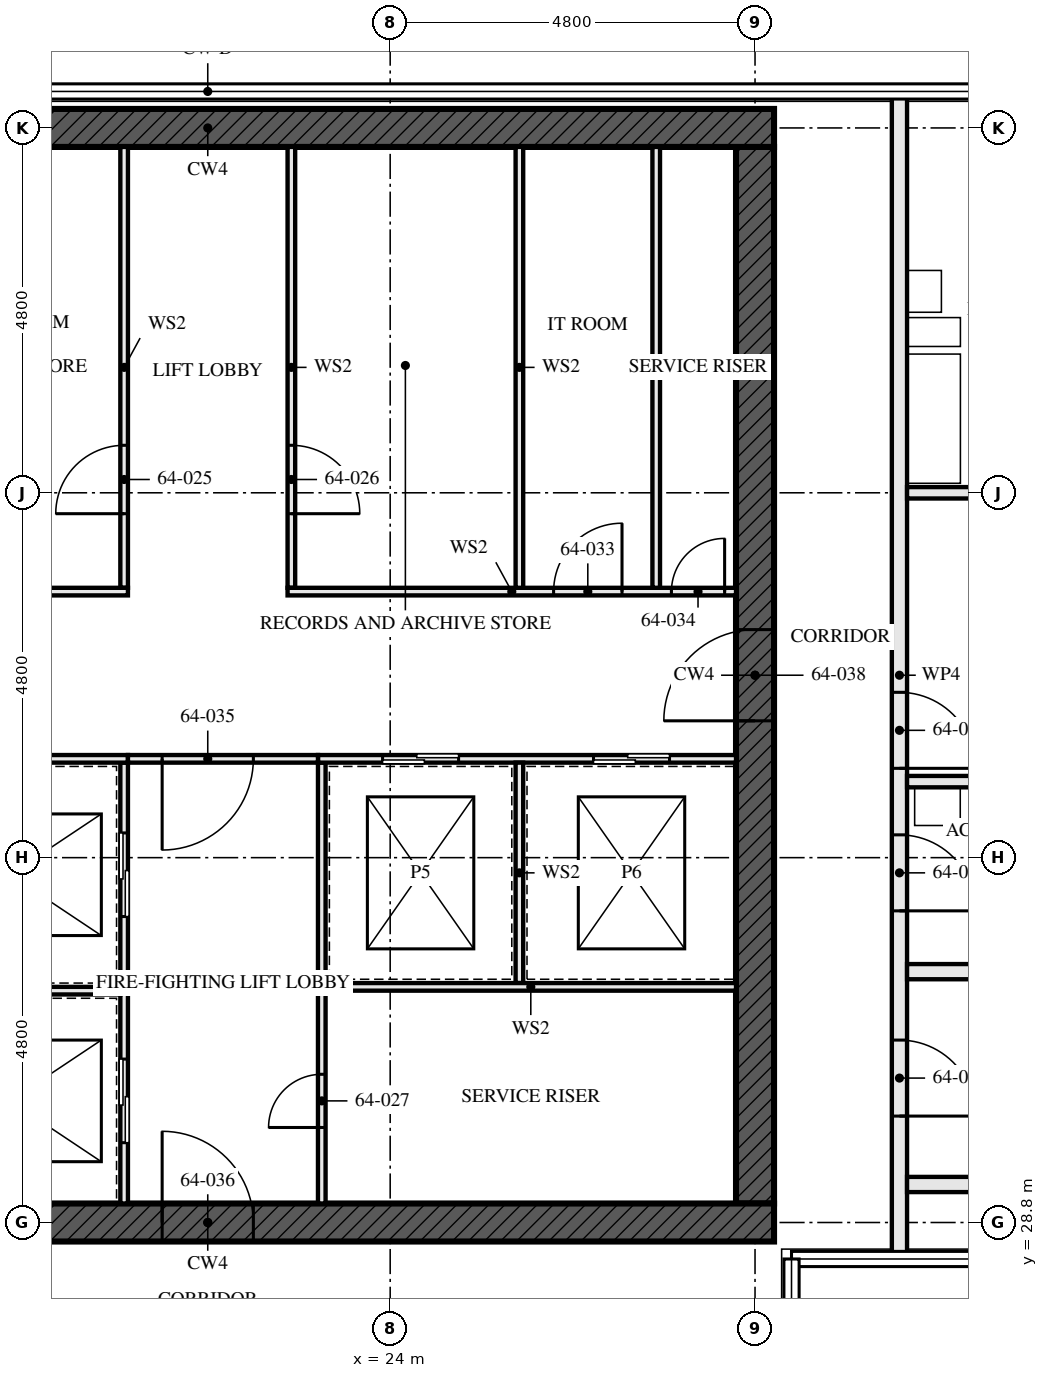
"""IFC4 building model, lengths in metres.
Left out: names, types, materials, properties, quantities, classifications, styles, units other than length and angle.
Written with IfcOpenShell. Run it as: python <this file> out.ifc"""

import sys

from ifc_helpers import new_model, si_unit, direction, frame, frame_2d, origin, place, context, subcontext, project, spatial, rectangle, extrude, element, fill, save


model = new_model("IFC4")
c1 = context("Model", 3, precision=1e-05, world=origin(), true_north=direction((0.0, 1.0)))
c2 = subcontext(c1, "Body", "Model", "MODEL_VIEW")
j1 = project(units=[si_unit("LENGTHUNIT", "METRE"), si_unit("PLANEANGLEUNIT", "RADIAN")], contexts=[c1])
p1 = place(None, origin())
s1 = spatial("IfcSite", under=j1, at=p1, CompositionType="ELEMENT")
p2 = place(p1, origin())
s2 = spatial("IfcBuilding", under=s1, at=p2, CompositionType="ELEMENT")
p3 = place(p2, frame((0.0, 0.0, 233.0)))
s3 = spatial("IfcBuildingStorey", under=s2, at=p3, CompositionType="ELEMENT", Elevation=233.0)
p4 = place(p3, frame((14.15, 28.8, -0.17), z_axis=(0.0, 0.0, 1.0), x_axis=(1.0, 0.0, 0.0)))
e1 = element("IfcWall", 1, at=p4, inside=s3, PredefinedType="SHEAR", context=c2, shape_type="SweptSolid", body=[
    extrude(rectangle(XDim=14.9, YDim=0.5, at=frame_2d((7.45, 0.0))), origin(), (0.0, 0.0, 1.0), 3.5),
])
p5 = place(p4, frame((6.85, 0.0, 0.17)))
e2 = element("IfcOpeningElement", 2, at=p5, cuts=e1, PredefinedType="OPENING", context=c2, shape_type="SweptSolid", body=[
    extrude(rectangle(XDim=1.2, YDim=2.1, at=frame_2d((0.6, 1.05))), frame((0.0, 0.26, 0.0), z_axis=(0.0, -1.0, 0.0), x_axis=(1.0, 0.0, 0.0)), (0.0, 0.0, 1.0), 0.521),
])
p6 = place(p3, frame((29.05, 43.2, -0.17), z_axis=(0.0, 0.0, 1.0), x_axis=(-1.0, 0.0, 0.0)))
e3 = element("IfcWall", 3, at=p6, inside=s3, PredefinedType="SHEAR", context=c2, shape_type="SweptSolid", body=[
    extrude(rectangle(XDim=14.9, YDim=0.5, at=frame_2d((7.45, 0.0))), origin(), (0.0, 0.0, 1.0), 3.5),
])
p7 = place(p3, frame((28.8, 29.05, -0.17), z_axis=(0.0, 0.0, 1.0), x_axis=(0.0, 1.0, 0.0)))
e4 = element("IfcWall", 4, at=p7, inside=s3, PredefinedType="SHEAR", context=c2, shape_type="SweptSolid", body=[
    extrude(rectangle(XDim=13.9, YDim=0.5, at=frame_2d((6.95, 0.0))), origin(), (0.0, 0.0, 1.0), 3.5),
])
p8 = place(p7, frame((6.35, 0.0, 0.17)))
e5 = element("IfcOpeningElement", 5, at=p8, cuts=e4, PredefinedType="OPENING", context=c2, shape_type="SweptSolid", body=[
    extrude(rectangle(XDim=1.2, YDim=2.1, at=frame_2d((0.6, 1.05))), frame((0.0, 0.26, 0.0), z_axis=(0.0, -1.0, 0.0), x_axis=(1.0, 0.0, 0.0)), (0.0, 0.0, 1.0), 0.521),
])
for number, where, z_axis, x_axis in (
    (6, (35.5, 29.3, 0.0), (0.0, 0.0, 1.0), (-1.0, 0.0, 0.0)),
    (7, (35.5, 32.1, 0.0), (0.0, 0.0, 1.0), (-1.0, 0.0, 0.0)),
):
    element("IfcWall", number, at=place(p3, frame(where, z_axis=z_axis, x_axis=x_axis)), inside=s3, PredefinedType="SOLIDWALL", context=c2, shape_type="SweptSolid", body=[
        extrude(rectangle(XDim=4.7, YDim=0.2, at=frame_2d((2.35, 0.0))), origin(), (0.0, 0.0, 1.0), 2.99),
    ])
p9 = place(p3, frame((33.8, 34.6, 0.0), z_axis=(0.0, 0.0, 1.0), x_axis=(-1.0, 0.0, 0.0)))
e8 = element("IfcWall", 8, at=p9, inside=s3, PredefinedType="PARTITIONING", context=c2, shape_type="SweptSolid", body=[
    extrude(rectangle(XDim=3.0, YDim=0.15, at=frame_2d((1.5, 0.0))), origin(), (0.0, 0.0, 1.0), 3.33),
])
p10 = place(p3, frame((33.8, 38.4, 0.0), z_axis=(0.0, 0.0, 1.0), x_axis=(-1.0, 0.0, 0.0)))
e9 = element("IfcWall", 9, at=p10, inside=s3, PredefinedType="PARTITIONING", context=c2, shape_type="SweptSolid", body=[
    extrude(rectangle(XDim=3.0, YDim=0.15, at=frame_2d((1.5, 0.0))), origin(), (0.0, 0.0, 1.0), 2.55),
])
p11 = place(p10, frame((1.05, 0.0, 0.0)))
e10 = element("IfcOpeningElement", 10, at=p11, cuts=e9, PredefinedType="OPENING", context=c2, shape_type="SweptSolid", body=[
    extrude(rectangle(XDim=0.9, YDim=2.1, at=frame_2d((0.45, 1.05))), frame((0.0, 0.085, 0.0), z_axis=(0.0, -1.0, 0.0), x_axis=(1.0, 0.0, 0.0)), (0.0, 0.0, 1.0), 0.171),
])
p12 = place(p3, frame((30.7, 28.345, 0.0), z_axis=(0.0, 0.0, 1.0), x_axis=(0.0, 1.0, 0.0)))
e11 = element("IfcWall", 11, at=p12, inside=s3, PredefinedType="PARTITIONING", context=c2, shape_type="SweptSolid", body=[
    extrude(rectangle(XDim=15.31, YDim=0.2, at=frame_2d((7.655, 0.0))), origin(), (0.0, 0.0, 1.0), 2.32),
])
p13 = place(p12, frame((1.855, 0.0, 0.0)))
e12 = element("IfcOpeningElement", 12, at=p13, cuts=e11, PredefinedType="OPENING", context=c2, shape_type="SweptSolid", body=[
    extrude(rectangle(XDim=1.0, YDim=2.1, at=frame_2d((0.5, 1.05))), frame((0.0, 0.111, 0.0), z_axis=(0.0, -1.0, 0.0), x_axis=(1.0, 0.0, 0.0)), (0.0, 0.0, 1.0), 0.221),
])
p14 = place(p12, frame((4.555, 0.0, 0.0)))
e13 = element("IfcOpeningElement", 13, at=p14, cuts=e11, PredefinedType="OPENING", context=c2, shape_type="SweptSolid", body=[
    extrude(rectangle(XDim=1.0, YDim=2.1, at=frame_2d((0.5, 1.05))), frame((0.0, 0.111, 0.0), z_axis=(0.0, -1.0, 0.0), x_axis=(1.0, 0.0, 0.0)), (0.0, 0.0, 1.0), 0.221),
])
p15 = place(p12, frame((6.43, 0.0, 0.0)))
e14 = element("IfcOpeningElement", 14, at=p15, cuts=e11, PredefinedType="OPENING", context=c2, shape_type="SweptSolid", body=[
    extrude(rectangle(XDim=1.0, YDim=2.1, at=frame_2d((0.5, 1.05))), frame((0.0, 0.111, 0.0), z_axis=(0.0, -1.0, 0.0), x_axis=(1.0, 0.0, 0.0)), (0.0, 0.0, 1.0), 0.221),
])
p16 = place(p3, frame((27.5, 37.15, 0.0), z_axis=(0.0, 0.0, 1.0), x_axis=(0.0, 1.0, 0.0)))
e15 = element("IfcWall", 15, at=p16, inside=s3, PredefinedType="SOLIDWALL", context=c2, shape_type="SweptSolid", body=[
    extrude(rectangle(XDim=5.8, YDim=0.1, at=frame_2d((2.9, 0.0))), origin(), (0.0, 0.0, 1.0), 3.33),
])
p17 = place(p3, frame((20.5, 29.05, 0.0), z_axis=(0.0, 0.0, 1.0), x_axis=(0.0, 1.0, 0.0)))
e16 = element("IfcWall", 16, at=p17, inside=s3, PredefinedType="SOLIDWALL", context=c2, shape_type="SweptSolid", body=[
    extrude(rectangle(XDim=5.8, YDim=0.1, at=frame_2d((2.9, 0.0))), origin(), (0.0, 0.0, 1.0), 3.33),
])
p18 = place(p17, frame((0.8, 0.0, 0.0)))
e17 = element("IfcOpeningElement", 17, at=p18, cuts=e16, PredefinedType="OPENING", context=c2, shape_type="SweptSolid", body=[
    extrude(rectangle(XDim=1.1, YDim=2.3, at=frame_2d((0.55, 1.15))), frame((0.0, 0.061, 0.0), z_axis=(0.0, -1.0, 0.0), x_axis=(1.0, 0.0, 0.0)), (0.0, 0.0, 1.0), 0.121),
])
p19 = place(p17, frame((3.775, 0.0, 0.0)))
e18 = element("IfcOpeningElement", 18, at=p19, cuts=e16, PredefinedType="OPENING", context=c2, shape_type="SweptSolid", body=[
    extrude(rectangle(XDim=1.1, YDim=2.3, at=frame_2d((0.55, 1.15))), frame((0.0, 0.061, 0.0), z_axis=(0.0, -1.0, 0.0), x_axis=(1.0, 0.0, 0.0)), (0.0, 0.0, 1.0), 0.121),
])
p20 = place(p3, frame((20.5, 37.15, 0.0), z_axis=(0.0, 0.0, 1.0), x_axis=(0.0, 1.0, 0.0)))
e19 = element("IfcWall", 19, at=p20, inside=s3, PredefinedType="SOLIDWALL", context=c2, shape_type="SweptSolid", body=[
    extrude(rectangle(XDim=5.8, YDim=0.1, at=frame_2d((2.9, 0.0))), origin(), (0.0, 0.0, 1.0), 3.33),
])
p21 = place(p20, frame((0.975, 0.0, 0.0)))
e20 = element("IfcOpeningElement", 20, at=p21, cuts=e19, PredefinedType="OPENING", context=c2, shape_type="SweptSolid", body=[
    extrude(rectangle(XDim=0.9, YDim=2.1, at=frame_2d((0.45, 1.05))), frame((0.0, 0.061, 0.0), z_axis=(0.0, -1.0, 0.0), x_axis=(1.0, 0.0, 0.0)), (0.0, 0.0, 1.0), 0.121),
])
p22 = place(p3, frame((22.7, 37.15, 0.0), z_axis=(0.0, 0.0, 1.0), x_axis=(0.0, 1.0, 0.0)))
e21 = element("IfcWall", 21, at=p22, inside=s3, PredefinedType="SOLIDWALL", context=c2, shape_type="SweptSolid", body=[
    extrude(rectangle(XDim=5.8, YDim=0.1, at=frame_2d((2.9, 0.0))), origin(), (0.0, 0.0, 1.0), 3.33),
])
p23 = place(p22, frame((0.975, 0.0, 0.0)))
e22 = element("IfcOpeningElement", 22, at=p23, cuts=e21, PredefinedType="OPENING", context=c2, shape_type="SweptSolid", body=[
    extrude(rectangle(XDim=0.9, YDim=2.1, at=frame_2d((0.45, 1.05))), frame((0.0, 0.061, 0.0), z_axis=(0.0, -1.0, 0.0), x_axis=(1.0, 0.0, 0.0)), (0.0, 0.0, 1.0), 0.121),
])
p24 = place(p3, frame((23.1, 29.05, 0.0), z_axis=(0.0, 0.0, 1.0), x_axis=(0.0, 1.0, 0.0)))
e23 = element("IfcWall", 23, at=p24, inside=s3, PredefinedType="SOLIDWALL", context=c2, shape_type="SweptSolid", body=[
    extrude(rectangle(XDim=5.8, YDim=0.1, at=frame_2d((2.9, 0.0))), origin(), (0.0, 0.0, 1.0), 3.33),
])
p25 = place(p24, frame((1.0, 0.0, 0.0)))
e24 = element("IfcOpeningElement", 24, at=p25, cuts=e23, PredefinedType="OPENING", context=c2, shape_type="SweptSolid", body=[
    extrude(rectangle(XDim=0.7, YDim=2.1, at=frame_2d((0.35, 1.05))), frame((0.0, 0.061, 0.0), z_axis=(0.0, -1.0, 0.0), x_axis=(1.0, 0.0, 0.0)), (0.0, 0.0, 1.0), 0.121),
])
p26 = place(p3, frame((14.65, 34.9, 0.0), z_axis=(0.0, 0.0, 1.0), x_axis=(1.0, 0.0, 0.0)))
e25 = element("IfcWall", 25, at=p26, inside=s3, PredefinedType="SOLIDWALL", context=c2, shape_type="SweptSolid", body=[
    extrude(rectangle(XDim=5.9, YDim=0.1, at=frame_2d((2.95, 0.0))), origin(), (0.0, 0.0, 1.0), 3.33),
])
p27 = place(p26, frame((1.6, 0.0, 0.0)))
e26 = element("IfcOpeningElement", 26, at=p27, cuts=e25, PredefinedType="OPENING", context=c2, shape_type="SweptSolid", body=[
    extrude(rectangle(XDim=0.7, YDim=2.1, at=frame_2d((0.35, 1.05))), frame((0.0, 0.061, 0.0), z_axis=(0.0, -1.0, 0.0), x_axis=(1.0, 0.0, 0.0)), (0.0, 0.0, 1.0), 0.121),
])
p28 = place(p3, frame((23.05, 34.9, 0.0), z_axis=(0.0, 0.0, 1.0), x_axis=(1.0, 0.0, 0.0)))
e27 = element("IfcWall", 27, at=p28, inside=s3, PredefinedType="SOLIDWALL", context=c2, shape_type="SweptSolid", body=[
    extrude(rectangle(XDim=5.5, YDim=0.1, at=frame_2d((2.75, 0.0))), origin(), (0.0, 0.0, 1.0), 3.33),
])
p29 = place(p28, frame((0.85, 0.0, 0.0)))
e28 = element("IfcOpeningElement", 28, at=p29, cuts=e27, PredefinedType="OPENING", context=c2, shape_type="SweptSolid", body=[
    extrude(rectangle(XDim=1.0, YDim=2.1, at=frame_2d((0.5, 1.05))), frame((0.0, 0.061, 0.0), z_axis=(0.0, -1.0, 0.0), x_axis=(1.0, 0.0, 0.0)), (0.0, 0.0, 1.0), 0.121),
])
p30 = place(p28, frame((3.625, 0.0, 0.0)))
e29 = element("IfcOpeningElement", 29, at=p30, cuts=e27, PredefinedType="OPENING", context=c2, shape_type="SweptSolid", body=[
    extrude(rectangle(XDim=1.0, YDim=2.1, at=frame_2d((0.5, 1.05))), frame((0.0, 0.061, 0.0), z_axis=(0.0, -1.0, 0.0), x_axis=(1.0, 0.0, 0.0)), (0.0, 0.0, 1.0), 0.121),
])
p31 = place(p3, frame((14.65, 37.1, 0.0), z_axis=(0.0, 0.0, 1.0), x_axis=(1.0, 0.0, 0.0)))
e30 = element("IfcWall", 30, at=p31, inside=s3, PredefinedType="SOLIDWALL", context=c2, shape_type="SweptSolid", body=[
    extrude(rectangle(XDim=5.9, YDim=0.1, at=frame_2d((2.95, 0.0))), origin(), (0.0, 0.0, 1.0), 3.33),
])
p32 = place(p31, frame((0.15, 0.0, 0.0)))
e31 = element("IfcOpeningElement", 31, at=p32, cuts=e30, PredefinedType="OPENING", context=c2, shape_type="SweptSolid", body=[
    extrude(rectangle(XDim=0.7, YDim=2.1, at=frame_2d((0.35, 1.05))), frame((0.0, 0.061, 0.0), z_axis=(0.0, -1.0, 0.0), x_axis=(1.0, 0.0, 0.0)), (0.0, 0.0, 1.0), 0.121),
])
p33 = place(p31, frame((1.5, 0.0, 0.0)))
e32 = element("IfcOpeningElement", 32, at=p33, cuts=e30, PredefinedType="OPENING", context=c2, shape_type="SweptSolid", body=[
    extrude(rectangle(XDim=0.9, YDim=2.1, at=frame_2d((0.45, 1.05))), frame((0.0, 0.061, 0.0), z_axis=(0.0, -1.0, 0.0), x_axis=(1.0, 0.0, 0.0)), (0.0, 0.0, 1.0), 0.121),
])
p34 = place(p3, frame((22.65, 37.1, 0.0), z_axis=(0.0, 0.0, 1.0), x_axis=(1.0, 0.0, 0.0)))
e33 = element("IfcWall", 33, at=p34, inside=s3, PredefinedType="SOLIDWALL", context=c2, shape_type="SweptSolid", body=[
    extrude(rectangle(XDim=5.9, YDim=0.1, at=frame_2d((2.95, 0.0))), origin(), (0.0, 0.0, 1.0), 3.33),
])
p35 = place(p34, frame((3.5, 0.0, 0.0)))
e34 = element("IfcOpeningElement", 34, at=p35, cuts=e33, PredefinedType="OPENING", context=c2, shape_type="SweptSolid", body=[
    extrude(rectangle(XDim=0.9, YDim=2.1, at=frame_2d((0.45, 1.05))), frame((0.0, 0.061, 0.0), z_axis=(0.0, -1.0, 0.0), x_axis=(1.0, 0.0, 0.0)), (0.0, 0.0, 1.0), 0.121),
])
p36 = place(p34, frame((5.05, 0.0, 0.0)))
e35 = element("IfcOpeningElement", 35, at=p36, cuts=e33, PredefinedType="OPENING", context=c2, shape_type="SweptSolid", body=[
    extrude(rectangle(XDim=0.7, YDim=2.1, at=frame_2d((0.35, 1.05))), frame((0.0, 0.061, 0.0), z_axis=(0.0, -1.0, 0.0), x_axis=(1.0, 0.0, 0.0)), (0.0, 0.0, 1.0), 0.121),
])
p37 = place(p3, frame((20.55, 34.9, 0.0), z_axis=(0.0, 0.0, 1.0), x_axis=(1.0, 0.0, 0.0)))
e36 = element("IfcWall", 36, at=p37, inside=s3, PredefinedType="SOLIDWALL", context=c2, shape_type="SweptSolid", body=[
    extrude(rectangle(XDim=2.5, YDim=0.1, at=frame_2d((1.25, 0.0))), origin(), (0.0, 0.0, 1.0), 3.33),
])
p38 = place(p37, frame((0.45, 0.0, 0.0)))
e37 = element("IfcOpeningElement", 37, at=p38, cuts=e36, PredefinedType="OPENING", context=c2, shape_type="SweptSolid", body=[
    extrude(rectangle(XDim=1.2, YDim=2.1, at=frame_2d((0.6, 1.05))), frame((0.0, 0.061, 0.0), z_axis=(0.0, -1.0, 0.0), x_axis=(1.0, 0.0, 0.0)), (0.0, 0.0, 1.0), 0.121),
])
p39 = place(p3, frame((17.55, 31.85, 0.0), z_axis=(0.0, 0.0, 1.0), x_axis=(1.0, 0.0, 0.0)))
e38 = element("IfcWall", 38, at=p39, inside=s3, PredefinedType="SOLIDWALL", context=c2, shape_type="SweptSolid", body=[
    extrude(rectangle(XDim=2.9, YDim=0.1, at=frame_2d((1.45, 0.0))), origin(), (0.0, 0.0, 1.0), 3.33),
])
p40 = place(p3, frame((25.7, 37.15, 0.0), z_axis=(0.0, 0.0, 1.0), x_axis=(0.0, 1.0, 0.0)))
e39 = element("IfcWall", 39, at=p40, inside=s3, PredefinedType="SOLIDWALL", context=c2, shape_type="SweptSolid", body=[
    extrude(rectangle(XDim=5.8, YDim=0.1, at=frame_2d((2.9, 0.0))), origin(), (0.0, 0.0, 1.0), 3.33),
])
p41 = place(p3, frame((25.7, 31.95, 0.0), z_axis=(0.0, 0.0, 1.0), x_axis=(0.0, 1.0, 0.0)))
e40 = element("IfcWall", 40, at=p41, inside=s3, PredefinedType="SOLIDWALL", context=c2, shape_type="SweptSolid", body=[
    extrude(rectangle(XDim=2.9, YDim=0.1, at=frame_2d((1.45, 0.0))), origin(), (0.0, 0.0, 1.0), 3.33),
])
p42 = place(p3, frame((23.15, 31.9, 0.0), z_axis=(0.0, 0.0, 1.0), x_axis=(1.0, 0.0, 0.0)))
e41 = element("IfcWall", 41, at=p42, inside=s3, PredefinedType="SOLIDWALL", context=c2, shape_type="SweptSolid", body=[
    extrude(rectangle(XDim=5.4, YDim=0.1, at=frame_2d((2.7, 0.0))), origin(), (0.0, 0.0, 1.0), 3.33),
])
p43 = place(p13, frame((1.0, 0.0, 0.0), z_axis=(0.0, 0.0, 1.0), x_axis=(-1.0, 0.0, 0.0)))
e42 = element("IfcDoor", 42, at=p43, inside=s3, OperationType="SINGLE_SWING_LEFT", PredefinedType="DOOR", context=c2, shape_type="SweptSolid", body=[
    extrude(rectangle(XDim=1.0, YDim=2.1, at=frame_2d((0.5, 1.05))), frame((0.0, 0.032, 0.0), z_axis=(0.0, -1.0, 0.0), x_axis=(1.0, 0.0, 0.0)), (0.0, 0.0, 1.0), 0.064),
])
fill(e12, e42)
p44 = place(p14, frame((1.0, 0.0, 0.0), z_axis=(0.0, 0.0, 1.0), x_axis=(-1.0, 0.0, 0.0)))
e43 = element("IfcDoor", 43, at=p44, inside=s3, OperationType="SINGLE_SWING_LEFT", PredefinedType="DOOR", context=c2, shape_type="SweptSolid", body=[
    extrude(rectangle(XDim=1.0, YDim=2.1, at=frame_2d((0.5, 1.05))), frame((0.0, 0.027, 0.0), z_axis=(0.0, -1.0, 0.0), x_axis=(1.0, 0.0, 0.0)), (0.0, 0.0, 1.0), 0.054),
])
fill(e13, e43)
p45 = place(p15, frame((1.0, 0.0, 0.0), z_axis=(0.0, 0.0, 1.0), x_axis=(-1.0, 0.0, 0.0)))
e44 = element("IfcDoor", 44, at=p45, inside=s3, OperationType="SINGLE_SWING_LEFT", PredefinedType="DOOR", context=c2, shape_type="SweptSolid", body=[
    extrude(rectangle(XDim=1.0, YDim=2.1, at=frame_2d((0.5, 1.05))), frame((0.0, 0.027, 0.0), z_axis=(0.0, -1.0, 0.0), x_axis=(1.0, 0.0, 0.0)), (0.0, 0.0, 1.0), 0.054),
])
fill(e14, e44)
p46 = place(p18, origin())
e45 = element("IfcDoor", 45, at=p46, inside=s3, OperationType="SLIDING_TO_LEFT", PredefinedType="DOOR", context=c2, shape_type="SweptSolid", body=[
    extrude(rectangle(XDim=1.1, YDim=2.3, at=frame_2d((0.55, 1.15))), frame((0.0, 0.05, 0.0), z_axis=(0.0, -1.0, 0.0), x_axis=(1.0, 0.0, 0.0)), (0.0, 0.0, 1.0), 0.1),
])
fill(e17, e45)
p47 = place(p19, origin())
e46 = element("IfcDoor", 46, at=p47, inside=s3, OperationType="SLIDING_TO_LEFT", PredefinedType="DOOR", context=c2, shape_type="SweptSolid", body=[
    extrude(rectangle(XDim=1.1, YDim=2.3, at=frame_2d((0.55, 1.15))), frame((0.0, 0.05, 0.0), z_axis=(0.0, -1.0, 0.0), x_axis=(1.0, 0.0, 0.0)), (0.0, 0.0, 1.0), 0.1),
])
fill(e18, e46)
p48 = place(p21, origin())
e47 = element("IfcDoor", 47, at=p48, inside=s3, OperationType="SINGLE_SWING_RIGHT", PredefinedType="DOOR", context=c2, shape_type="SweptSolid", body=[
    extrude(rectangle(XDim=0.9, YDim=2.1, at=frame_2d((0.45, 1.05))), frame((0.0, 0.027, 0.0), z_axis=(0.0, -1.0, 0.0), x_axis=(1.0, 0.0, 0.0)), (0.0, 0.0, 1.0), 0.054),
])
fill(e20, e47)
p49 = place(p23, frame((0.9, 0.0, 0.0), z_axis=(0.0, 0.0, 1.0), x_axis=(-1.0, 0.0, 0.0)))
e48 = element("IfcDoor", 48, at=p49, inside=s3, OperationType="SINGLE_SWING_LEFT", PredefinedType="DOOR", context=c2, shape_type="SweptSolid", body=[
    extrude(rectangle(XDim=0.9, YDim=2.1, at=frame_2d((0.45, 1.05))), frame((0.0, 0.027, 0.0), z_axis=(0.0, -1.0, 0.0), x_axis=(1.0, 0.0, 0.0)), (0.0, 0.0, 1.0), 0.054),
])
fill(e22, e48)
p50 = place(p25, origin())
e49 = element("IfcDoor", 49, at=p50, inside=s3, OperationType="SINGLE_SWING_RIGHT", PredefinedType="DOOR", context=c2, shape_type="SweptSolid", body=[
    extrude(rectangle(XDim=0.7, YDim=2.1, at=frame_2d((0.35, 1.05))), frame((0.0, 0.027, 0.0), z_axis=(0.0, -1.0, 0.0), x_axis=(1.0, 0.0, 0.0)), (0.0, 0.0, 1.0), 0.054),
])
fill(e24, e49)
p51 = place(p29, origin())
e50 = element("IfcDoor", 50, at=p51, inside=s3, OperationType="SLIDING_TO_LEFT", PredefinedType="DOOR", context=c2, shape_type="SweptSolid", body=[
    extrude(rectangle(XDim=1.0, YDim=2.1, at=frame_2d((0.5, 1.05))), frame((0.0, 0.05, 0.0), z_axis=(0.0, -1.0, 0.0), x_axis=(1.0, 0.0, 0.0)), (0.0, 0.0, 1.0), 0.1),
])
fill(e28, e50)
p52 = place(p30, origin())
e51 = element("IfcDoor", 51, at=p52, inside=s3, OperationType="SLIDING_TO_LEFT", PredefinedType="DOOR", context=c2, shape_type="SweptSolid", body=[
    extrude(rectangle(XDim=1.0, YDim=2.1, at=frame_2d((0.5, 1.05))), frame((0.0, 0.05, 0.0), z_axis=(0.0, -1.0, 0.0), x_axis=(1.0, 0.0, 0.0)), (0.0, 0.0, 1.0), 0.1),
])
fill(e29, e51)
p53 = place(p35, origin())
e52 = element("IfcDoor", 52, at=p53, inside=s3, OperationType="SINGLE_SWING_LEFT", PredefinedType="DOOR", context=c2, shape_type="SweptSolid", body=[
    extrude(rectangle(XDim=0.9, YDim=2.1, at=frame_2d((0.45, 1.05))), frame((0.0, 0.027, 0.0), z_axis=(0.0, -1.0, 0.0), x_axis=(1.0, 0.0, 0.0)), (0.0, 0.0, 1.0), 0.054),
])
fill(e34, e52)
p54 = place(p36, origin())
e53 = element("IfcDoor", 53, at=p54, inside=s3, OperationType="SINGLE_SWING_LEFT", PredefinedType="DOOR", context=c2, shape_type="SweptSolid", body=[
    extrude(rectangle(XDim=0.7, YDim=2.1, at=frame_2d((0.35, 1.05))), frame((0.0, 0.027, 0.0), z_axis=(0.0, -1.0, 0.0), x_axis=(1.0, 0.0, 0.0)), (0.0, 0.0, 1.0), 0.054),
])
fill(e35, e53)
p55 = place(p38, frame((1.2, 0.0, 0.0), z_axis=(0.0, 0.0, 1.0), x_axis=(-1.0, 0.0, 0.0)))
e54 = element("IfcDoor", 54, at=p55, inside=s3, OperationType="SINGLE_SWING_LEFT", PredefinedType="DOOR", context=c2, shape_type="SweptSolid", body=[
    extrude(rectangle(XDim=1.2, YDim=2.1, at=frame_2d((0.6, 1.05))), frame((0.0, 0.027, 0.0), z_axis=(0.0, -1.0, 0.0), x_axis=(1.0, 0.0, 0.0)), (0.0, 0.0, 1.0), 0.054),
])
fill(e37, e54)
p56 = place(p5, origin())
e55 = element("IfcDoor", 55, at=p56, inside=s3, OperationType="SINGLE_SWING_LEFT", PredefinedType="DOOR", context=c2, shape_type="SweptSolid", body=[
    extrude(rectangle(XDim=1.2, YDim=2.1, at=frame_2d((0.6, 1.05))), frame((0.0, 0.027, 0.0), z_axis=(0.0, -1.0, 0.0), x_axis=(1.0, 0.0, 0.0)), (0.0, 0.0, 1.0), 0.054),
])
fill(e2, e55)
p57 = place(p8, origin())
e56 = element("IfcDoor", 56, at=p57, inside=s3, OperationType="SINGLE_SWING_LEFT", PredefinedType="DOOR", context=c2, shape_type="SweptSolid", body=[
    extrude(rectangle(XDim=1.2, YDim=2.1, at=frame_2d((0.6, 1.05))), frame((0.0, 0.027, 0.0), z_axis=(0.0, -1.0, 0.0), x_axis=(1.0, 0.0, 0.0)), (0.0, 0.0, 1.0), 0.054),
])
fill(e5, e56)
save(model, sys.argv[1])
